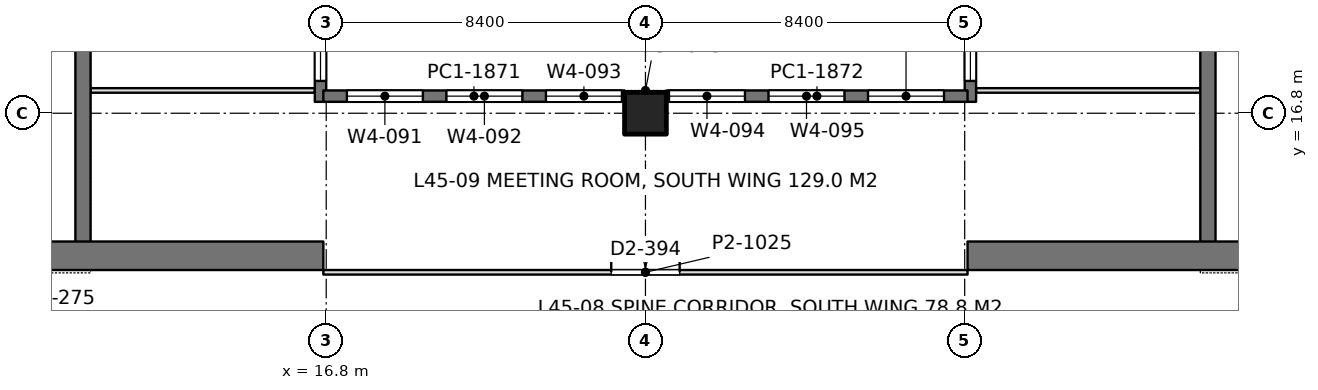
"""IFC4 building model, lengths in metres.
Left out: names, types, materials, properties, quantities, classifications, styles, units other than length and angle.
Written with IfcOpenShell. Run it as: python <this file> out.ifc"""

import sys

from ifc_helpers import new_model, si_unit, direction, frame, frame_2d, origin, origin_2d, place, context, subcontext, project, spatial, rectangle, extrude, element, fill, save


model = new_model("IFC4")
c1 = context("Model", 3, precision=1e-05, world=origin(), true_north=direction((0.0, 1.0)))
c2 = subcontext(c1, "Body", "Model", "MODEL_VIEW")
j1 = project(units=[si_unit("LENGTHUNIT", "METRE"), si_unit("PLANEANGLEUNIT", "RADIAN")], contexts=[c1])
p1 = place(None, origin())
s1 = spatial("IfcSite", under=j1, at=p1, CompositionType="ELEMENT")
p2 = place(p1, origin())
s2 = spatial("IfcBuilding", under=s1, at=p2, CompositionType="ELEMENT")
p3 = place(p2, frame((0.0, 0.0, 198.6)))
s3 = spatial("IfcBuildingStorey", under=s2, at=p3, CompositionType="ELEMENT", Elevation=198.6)
p4 = place(p3, frame((25.2, 16.8, 0.0), z_axis=(0.0, 0.0, 1.0), x_axis=(1.0, 0.0, 0.0)))
e1 = element("IfcColumn", 1, at=p4, inside=s3, PredefinedType="COLUMN", context=c2, shape_type="SweptSolid", body=[
    extrude(rectangle(XDim=1.1, YDim=1.1, at=origin_2d()), origin(), (0.0, 0.0, 1.0), 4.2),
])
p5 = place(p3, frame((-1.125, 13.05, 0.0), z_axis=(0.0, 0.0, 1.0), x_axis=(1.0, 0.0, 0.0)))
e2 = element("IfcWall", 2, at=p5, inside=s3, PredefinedType="SHEAR", context=c2, shape_type="SweptSolid", body=[
    extrude(rectangle(XDim=17.85, YDim=0.75, at=frame_2d((8.925, 0.0))), origin(), (0.0, 0.0, 1.0), 4.2),
])
p6 = place(p5, frame((8.875, 0.0, 0.0)))
e3 = element("IfcOpeningElement", 3, at=p6, cuts=e2, PredefinedType="OPENING", context=c2, shape_type="SweptSolid", body=[
    extrude(rectangle(XDim=1.8, YDim=2.4, at=frame_2d((0.9, 1.2))), frame((0.0, 0.385, 0.0), z_axis=(0.0, -1.0, 0.0), x_axis=(1.0, 0.0, 0.0)), (0.0, 0.0, 1.0), 0.77),
])
p7 = place(p3, frame((10.4, 13.05, 0.0), z_axis=(0.0, 0.0, 1.0), x_axis=(0.0, 1.0, 0.0)))
e4 = element("IfcWall", 4, at=p7, inside=s3, PredefinedType="SHEAR", context=c2, shape_type="SweptSolid", body=[
    extrude(rectangle(XDim=24.3, YDim=0.4, at=frame_2d((12.15, 0.0))), origin(), (0.0, 0.0, 1.0), 4.2),
])
p8 = place(p7, frame((15.75, 0.0, 0.0)))
e5 = element("IfcOpeningElement", 5, at=p8, cuts=e4, PredefinedType="OPENING", context=c2, shape_type="SweptSolid", body=[
    extrude(rectangle(XDim=1.1, YDim=2.2, at=frame_2d((0.55, 1.1))), frame((0.0, 0.21, 0.0), z_axis=(0.0, -1.0, 0.0), x_axis=(1.0, 0.0, 0.0)), (0.0, 0.0, 1.0), 0.42),
])
p9 = place(p7, frame((18.6, 0.0, 0.0)))
e6 = element("IfcOpeningElement", 6, at=p9, cuts=e4, PredefinedType="OPENING", context=c2, shape_type="SweptSolid", body=[
    extrude(rectangle(XDim=1.1, YDim=2.2, at=frame_2d((0.55, 1.1))), frame((0.0, 0.21, 0.0), z_axis=(0.0, -1.0, 0.0), x_axis=(1.0, 0.0, 0.0)), (0.0, 0.0, 1.0), 0.42),
])
p10 = place(p7, frame((21.45, 0.0, 0.0)))
e7 = element("IfcOpeningElement", 7, at=p10, cuts=e4, PredefinedType="OPENING", context=c2, shape_type="SweptSolid", body=[
    extrude(rectangle(XDim=1.1, YDim=2.2, at=frame_2d((0.55, 1.1))), frame((0.0, 0.21, 0.0), z_axis=(0.0, -1.0, 0.0), x_axis=(1.0, 0.0, 0.0)), (0.0, 0.0, 1.0), 0.42),
])
p11 = place(p7, frame((6.05, 0.0, 0.0)))
e8 = element("IfcOpeningElement", 8, at=p11, cuts=e4, PredefinedType="OPENING", context=c2, shape_type="SweptSolid", body=[
    extrude(rectangle(XDim=1.8, YDim=2.4, at=frame_2d((0.9, 1.2))), frame((0.0, 0.21, 0.0), z_axis=(0.0, -1.0, 0.0), x_axis=(1.0, 0.0, 0.0)), (0.0, 0.0, 1.0), 0.42),
])
p12 = place(p7, frame((11.25, 0.0, 0.0)))
e9 = element("IfcOpeningElement", 9, at=p12, cuts=e4, PredefinedType="OPENING", context=c2, shape_type="SweptSolid", body=[
    extrude(rectangle(XDim=1.8, YDim=2.4, at=frame_2d((0.9, 1.2))), frame((0.0, 0.21, 0.0), z_axis=(0.0, -1.0, 0.0), x_axis=(1.0, 0.0, 0.0)), (0.0, 0.0, 1.0), 0.42),
])
p13 = place(p3, frame((33.675, 13.05, 0.0), z_axis=(0.0, 0.0, 1.0), x_axis=(1.0, 0.0, 0.0)))
e10 = element("IfcWall", 10, at=p13, inside=s3, PredefinedType="SHEAR", context=c2, shape_type="SweptSolid", body=[
    extrude(rectangle(XDim=17.85, YDim=0.75, at=frame_2d((8.925, 0.0))), origin(), (0.0, 0.0, 1.0), 4.2),
])
p14 = place(p13, frame((7.175, 0.0, 0.0)))
e11 = element("IfcOpeningElement", 11, at=p14, cuts=e10, PredefinedType="OPENING", context=c2, shape_type="SweptSolid", body=[
    extrude(rectangle(XDim=1.8, YDim=2.4, at=frame_2d((0.9, 1.2))), frame((0.0, 0.385, 0.0), z_axis=(0.0, -1.0, 0.0), x_axis=(1.0, 0.0, 0.0)), (0.0, 0.0, 1.0), 0.77),
])
p15 = place(p3, frame((40.0, 13.05, 0.0), z_axis=(0.0, 0.0, 1.0), x_axis=(0.0, 1.0, 0.0)))
e12 = element("IfcWall", 12, at=p15, inside=s3, PredefinedType="SHEAR", context=c2, shape_type="SweptSolid", body=[
    extrude(rectangle(XDim=24.3, YDim=0.4, at=frame_2d((12.15, 0.0))), origin(), (0.0, 0.0, 1.0), 4.2),
])
p16 = place(p15, frame((15.75, 0.0, 0.0)))
e13 = element("IfcOpeningElement", 13, at=p16, cuts=e12, PredefinedType="OPENING", context=c2, shape_type="SweptSolid", body=[
    extrude(rectangle(XDim=1.1, YDim=2.2, at=frame_2d((0.55, 1.1))), frame((0.0, 0.21, 0.0), z_axis=(0.0, -1.0, 0.0), x_axis=(1.0, 0.0, 0.0)), (0.0, 0.0, 1.0), 0.42),
])
p17 = place(p15, frame((18.6, 0.0, 0.0)))
e14 = element("IfcOpeningElement", 14, at=p17, cuts=e12, PredefinedType="OPENING", context=c2, shape_type="SweptSolid", body=[
    extrude(rectangle(XDim=1.1, YDim=2.2, at=frame_2d((0.55, 1.1))), frame((0.0, 0.21, 0.0), z_axis=(0.0, -1.0, 0.0), x_axis=(1.0, 0.0, 0.0)), (0.0, 0.0, 1.0), 0.42),
])
p18 = place(p15, frame((21.45, 0.0, 0.0)))
e15 = element("IfcOpeningElement", 15, at=p18, cuts=e12, PredefinedType="OPENING", context=c2, shape_type="SweptSolid", body=[
    extrude(rectangle(XDim=1.1, YDim=2.2, at=frame_2d((0.55, 1.1))), frame((0.0, 0.21, 0.0), z_axis=(0.0, -1.0, 0.0), x_axis=(1.0, 0.0, 0.0)), (0.0, 0.0, 1.0), 0.42),
])
p19 = place(p15, frame((6.05, 0.0, 0.0)))
e16 = element("IfcOpeningElement", 16, at=p19, cuts=e12, PredefinedType="OPENING", context=c2, shape_type="SweptSolid", body=[
    extrude(rectangle(XDim=1.8, YDim=2.4, at=frame_2d((0.9, 1.2))), frame((0.0, 0.21, 0.0), z_axis=(0.0, -1.0, 0.0), x_axis=(1.0, 0.0, 0.0)), (0.0, 0.0, 1.0), 0.42),
])
p20 = place(p15, frame((11.25, 0.0, 0.0)))
e17 = element("IfcOpeningElement", 17, at=p20, cuts=e12, PredefinedType="OPENING", context=c2, shape_type="SweptSolid", body=[
    extrude(rectangle(XDim=1.8, YDim=2.4, at=frame_2d((0.9, 1.2))), frame((0.0, 0.21, 0.0), z_axis=(0.0, -1.0, 0.0), x_axis=(1.0, 0.0, 0.0)), (0.0, 0.0, 1.0), 0.42),
])
p21 = place(p3, frame((16.65, 17.1, 0.0), z_axis=(0.0, 0.0, 1.0), x_axis=(0.0, 1.0, 0.0)))
e18 = element("IfcWall", 18, at=p21, inside=s3, PredefinedType="SOLIDWALL", context=c2, shape_type="SweptSolid", body=[
    extrude(rectangle(XDim=10.7, YDim=0.3, at=frame_2d((5.35, 0.0))), origin(), (0.0, 0.0, 1.0), 4.05),
])
p22 = place(p21, frame((0.55, 0.0, 0.9)))
e19 = element("IfcOpeningElement", 19, at=p22, cuts=e18, PredefinedType="OPENING", context=c2, shape_type="SweptSolid", body=[
    extrude(rectangle(XDim=2.0, YDim=1.9, at=frame_2d((1.0, 0.95))), frame((0.0, 0.16, 0.0), z_axis=(0.0, -1.0, 0.0), x_axis=(1.0, 0.0, 0.0)), (0.0, 0.0, 1.0), 0.32),
])
p23 = place(p21, frame((2.9, 0.0, 0.9)))
e20 = element("IfcOpeningElement", 20, at=p23, cuts=e18, PredefinedType="OPENING", context=c2, shape_type="SweptSolid", body=[
    extrude(rectangle(XDim=2.0, YDim=1.9, at=frame_2d((1.0, 0.95))), frame((0.0, 0.16, 0.0), z_axis=(0.0, -1.0, 0.0), x_axis=(1.0, 0.0, 0.0)), (0.0, 0.0, 1.0), 0.32),
])
p24 = place(p21, frame((7.675, 0.0, 0.9)))
e21 = element("IfcOpeningElement", 21, at=p24, cuts=e18, PredefinedType="OPENING", context=c2, shape_type="SweptSolid", body=[
    extrude(rectangle(XDim=2.0, YDim=1.9, at=frame_2d((1.0, 0.95))), frame((0.0, 0.16, 0.0), z_axis=(0.0, -1.0, 0.0), x_axis=(1.0, 0.0, 0.0)), (0.0, 0.0, 1.0), 0.32),
])
p25 = place(p3, frame((33.75, 17.1, 0.0), z_axis=(0.0, 0.0, 1.0), x_axis=(0.0, 1.0, 0.0)))
e22 = element("IfcWall", 22, at=p25, inside=s3, PredefinedType="SOLIDWALL", context=c2, shape_type="SweptSolid", body=[
    extrude(rectangle(XDim=10.7, YDim=0.3, at=frame_2d((5.35, 0.0))), origin(), (0.0, 0.0, 1.0), 4.05),
])
p26 = place(p25, frame((0.55, 0.0, 0.9)))
e23 = element("IfcOpeningElement", 23, at=p26, cuts=e22, PredefinedType="OPENING", context=c2, shape_type="SweptSolid", body=[
    extrude(rectangle(XDim=2.0, YDim=1.9, at=frame_2d((1.0, 0.95))), frame((0.0, 0.16, 0.0), z_axis=(0.0, -1.0, 0.0), x_axis=(1.0, 0.0, 0.0)), (0.0, 0.0, 1.0), 0.32),
])
p27 = place(p25, frame((2.9, 0.0, 0.9)))
e24 = element("IfcOpeningElement", 24, at=p27, cuts=e22, PredefinedType="OPENING", context=c2, shape_type="SweptSolid", body=[
    extrude(rectangle(XDim=2.0, YDim=1.9, at=frame_2d((1.0, 0.95))), frame((0.0, 0.16, 0.0), z_axis=(0.0, -1.0, 0.0), x_axis=(1.0, 0.0, 0.0)), (0.0, 0.0, 1.0), 0.32),
])
p28 = place(p25, frame((7.675, 0.0, 0.9)))
e25 = element("IfcOpeningElement", 25, at=p28, cuts=e22, PredefinedType="OPENING", context=c2, shape_type="SweptSolid", body=[
    extrude(rectangle(XDim=2.0, YDim=1.9, at=frame_2d((1.0, 0.95))), frame((0.0, 0.16, 0.0), z_axis=(0.0, -1.0, 0.0), x_axis=(1.0, 0.0, 0.0)), (0.0, 0.0, 1.0), 0.32),
])
p29 = place(p3, frame((16.725, 17.25, 0.0), z_axis=(0.0, 0.0, 1.0), x_axis=(1.0, 0.0, 0.0)))
e26 = element("IfcWall", 26, at=p29, inside=s3, PredefinedType="SOLIDWALL", context=c2, shape_type="SweptSolid", body=[
    extrude(rectangle(XDim=7.925, YDim=0.3, at=frame_2d((3.962, 0.0))), origin(), (0.0, 0.0, 1.0), 4.05),
])
p30 = place(p29, frame((0.619, 0.0, 0.9)))
e27 = element("IfcOpeningElement", 27, at=p30, cuts=e26, PredefinedType="OPENING", context=c2, shape_type="SweptSolid", body=[
    extrude(rectangle(XDim=2.0, YDim=1.9, at=frame_2d((1.0, 0.95))), frame((0.0, 0.16, 0.0), z_axis=(0.0, -1.0, 0.0), x_axis=(1.0, 0.0, 0.0)), (0.0, 0.0, 1.0), 0.32),
])
p31 = place(p29, frame((3.238, 0.0, 0.9)))
e28 = element("IfcOpeningElement", 28, at=p31, cuts=e26, PredefinedType="OPENING", context=c2, shape_type="SweptSolid", body=[
    extrude(rectangle(XDim=2.0, YDim=1.9, at=frame_2d((1.0, 0.95))), frame((0.0, 0.16, 0.0), z_axis=(0.0, -1.0, 0.0), x_axis=(1.0, 0.0, 0.0)), (0.0, 0.0, 1.0), 0.32),
])
p32 = place(p29, frame((5.856, 0.0, 0.9)))
e29 = element("IfcOpeningElement", 29, at=p32, cuts=e26, PredefinedType="OPENING", context=c2, shape_type="SweptSolid", body=[
    extrude(rectangle(XDim=2.0, YDim=1.9, at=frame_2d((1.0, 0.95))), frame((0.0, 0.16, 0.0), z_axis=(0.0, -1.0, 0.0), x_axis=(1.0, 0.0, 0.0)), (0.0, 0.0, 1.0), 0.32),
])
p33 = place(p3, frame((25.75, 17.25, 0.0), z_axis=(0.0, 0.0, 1.0), x_axis=(1.0, 0.0, 0.0)))
e30 = element("IfcWall", 30, at=p33, inside=s3, PredefinedType="SOLIDWALL", context=c2, shape_type="SweptSolid", body=[
    extrude(rectangle(XDim=7.925, YDim=0.3, at=frame_2d((3.962, 0.0))), origin(), (0.0, 0.0, 1.0), 4.05),
])
p34 = place(p33, frame((0.069, 0.0, 0.9)))
e31 = element("IfcOpeningElement", 31, at=p34, cuts=e30, PredefinedType="OPENING", context=c2, shape_type="SweptSolid", body=[
    extrude(rectangle(XDim=2.0, YDim=1.9, at=frame_2d((1.0, 0.95))), frame((0.0, 0.16, 0.0), z_axis=(0.0, -1.0, 0.0), x_axis=(1.0, 0.0, 0.0)), (0.0, 0.0, 1.0), 0.32),
])
p35 = place(p33, frame((2.688, 0.0, 0.9)))
e32 = element("IfcOpeningElement", 32, at=p35, cuts=e30, PredefinedType="OPENING", context=c2, shape_type="SweptSolid", body=[
    extrude(rectangle(XDim=2.0, YDim=1.9, at=frame_2d((1.0, 0.95))), frame((0.0, 0.16, 0.0), z_axis=(0.0, -1.0, 0.0), x_axis=(1.0, 0.0, 0.0)), (0.0, 0.0, 1.0), 0.32),
])
p36 = place(p33, frame((5.306, 0.0, 0.9)))
e33 = element("IfcOpeningElement", 33, at=p36, cuts=e30, PredefinedType="OPENING", context=c2, shape_type="SweptSolid", body=[
    extrude(rectangle(XDim=2.0, YDim=1.9, at=frame_2d((1.0, 0.95))), frame((0.0, 0.16, 0.0), z_axis=(0.0, -1.0, 0.0), x_axis=(1.0, 0.0, 0.0)), (0.0, 0.0, 1.0), 0.32),
])
for number, where, z_axis, x_axis in (
    (34, (10.598, 17.4, 0.0), (0.0, 0.0, 1.0), (1.0, 0.0, 0.0)),
    (35, (33.898, 17.4, 0.0), (0.0, 0.0, 1.0), (1.0, 0.0, 0.0)),
):
    element("IfcWall", number, at=place(p3, frame(where, z_axis=z_axis, x_axis=x_axis)), inside=s3, PredefinedType="PARTITIONING", context=c2, shape_type="SweptSolid", body=[
        extrude(rectangle(XDim=5.904, YDim=0.12, at=frame_2d((2.952, 0.0))), origin(), (0.0, 0.0, 1.0), 3.55),
    ])
p37 = place(p3, frame((16.725, 12.615, 0.0), z_axis=(0.0, 0.0, 1.0), x_axis=(1.0, 0.0, 0.0)))
e36 = element("IfcWall", 36, at=p37, inside=s3, PredefinedType="PARTITIONING", context=c2, shape_type="SweptSolid", body=[
    extrude(rectangle(XDim=16.95, YDim=0.12, at=frame_2d((8.475, 0.0))), origin(), (0.0, 0.0, 1.0), 3.55),
])
p38 = place(p37, frame((7.575, 0.0, 0.0)))
e37 = element("IfcOpeningElement", 37, at=p38, cuts=e36, PredefinedType="OPENING", context=c2, shape_type="SweptSolid", body=[
    extrude(rectangle(XDim=1.8, YDim=2.2, at=frame_2d((0.9, 1.1))), frame((0.0, 0.07, 0.0), z_axis=(0.0, -1.0, 0.0), x_axis=(1.0, 0.0, 0.0)), (0.0, 0.0, 1.0), 0.14),
])
p39 = place(p22, origin())
e38 = element("IfcWindow", 38, at=p39, inside=s3, PartitioningType="SINGLE_PANEL", PredefinedType="WINDOW", context=c2, shape_type="SweptSolid", body=[
    extrude(rectangle(XDim=2.0, YDim=1.9, at=frame_2d((1.0, 0.95))), frame((0.0, 0.03, 0.0), z_axis=(0.0, -1.0, 0.0), x_axis=(1.0, 0.0, 0.0)), (0.0, 0.0, 1.0), 0.06),
])
fill(e19, e38)
p40 = place(p26, origin())
e39 = element("IfcWindow", 39, at=p40, inside=s3, PartitioningType="SINGLE_PANEL", PredefinedType="WINDOW", context=c2, shape_type="SweptSolid", body=[
    extrude(rectangle(XDim=2.0, YDim=1.9, at=frame_2d((1.0, 0.95))), frame((0.0, 0.03, 0.0), z_axis=(0.0, -1.0, 0.0), x_axis=(1.0, 0.0, 0.0)), (0.0, 0.0, 1.0), 0.06),
])
fill(e23, e39)
p41 = place(p30, origin())
e40 = element("IfcWindow", 40, at=p41, inside=s3, PartitioningType="SINGLE_PANEL", PredefinedType="WINDOW", context=c2, shape_type="SweptSolid", body=[
    extrude(rectangle(XDim=2.0, YDim=1.9, at=frame_2d((1.0, 0.95))), frame((0.0, 0.03, 0.0), z_axis=(0.0, -1.0, 0.0), x_axis=(1.0, 0.0, 0.0)), (0.0, 0.0, 1.0), 0.06),
])
fill(e27, e40)
p42 = place(p31, origin())
e41 = element("IfcWindow", 41, at=p42, inside=s3, PartitioningType="SINGLE_PANEL", PredefinedType="WINDOW", context=c2, shape_type="SweptSolid", body=[
    extrude(rectangle(XDim=2.0, YDim=1.9, at=frame_2d((1.0, 0.95))), frame((0.0, 0.03, 0.0), z_axis=(0.0, -1.0, 0.0), x_axis=(1.0, 0.0, 0.0)), (0.0, 0.0, 1.0), 0.06),
])
fill(e28, e41)
p43 = place(p32, origin())
e42 = element("IfcWindow", 42, at=p43, inside=s3, PartitioningType="SINGLE_PANEL", PredefinedType="WINDOW", context=c2, shape_type="SweptSolid", body=[
    extrude(rectangle(XDim=2.0, YDim=1.9, at=frame_2d((1.0, 0.95))), frame((0.0, 0.03, 0.0), z_axis=(0.0, -1.0, 0.0), x_axis=(1.0, 0.0, 0.0)), (0.0, 0.0, 1.0), 0.06),
])
fill(e29, e42)
p44 = place(p34, origin())
e43 = element("IfcWindow", 43, at=p44, inside=s3, PartitioningType="SINGLE_PANEL", PredefinedType="WINDOW", context=c2, shape_type="SweptSolid", body=[
    extrude(rectangle(XDim=2.0, YDim=1.9, at=frame_2d((1.0, 0.95))), frame((0.0, 0.03, 0.0), z_axis=(0.0, -1.0, 0.0), x_axis=(1.0, 0.0, 0.0)), (0.0, 0.0, 1.0), 0.06),
])
fill(e31, e43)
p45 = place(p35, origin())
e44 = element("IfcWindow", 44, at=p45, inside=s3, PartitioningType="SINGLE_PANEL", PredefinedType="WINDOW", context=c2, shape_type="SweptSolid", body=[
    extrude(rectangle(XDim=2.0, YDim=1.9, at=frame_2d((1.0, 0.95))), frame((0.0, 0.03, 0.0), z_axis=(0.0, -1.0, 0.0), x_axis=(1.0, 0.0, 0.0)), (0.0, 0.0, 1.0), 0.06),
])
fill(e32, e44)
p46 = place(p36, origin())
e45 = element("IfcWindow", 45, at=p46, inside=s3, PartitioningType="SINGLE_PANEL", PredefinedType="WINDOW", context=c2, shape_type="SweptSolid", body=[
    extrude(rectangle(XDim=2.0, YDim=1.9, at=frame_2d((1.0, 0.95))), frame((0.0, 0.03, 0.0), z_axis=(0.0, -1.0, 0.0), x_axis=(1.0, 0.0, 0.0)), (0.0, 0.0, 1.0), 0.06),
])
fill(e33, e45)
p47 = place(p38, origin())
e46 = element("IfcDoor", 46, at=p47, inside=s3, OperationType="DOUBLE_DOOR_SINGLE_SWING", PredefinedType="DOOR", context=c2, shape_type="SweptSolid", body=[
    extrude(rectangle(XDim=1.8, YDim=2.2, at=frame_2d((0.9, 1.1))), frame((0.0, 0.025, 0.0), z_axis=(0.0, -1.0, 0.0), x_axis=(1.0, 0.0, 0.0)), (0.0, 0.0, 1.0), 0.05),
])
fill(e37, e46)
save(model, sys.argv[1])
